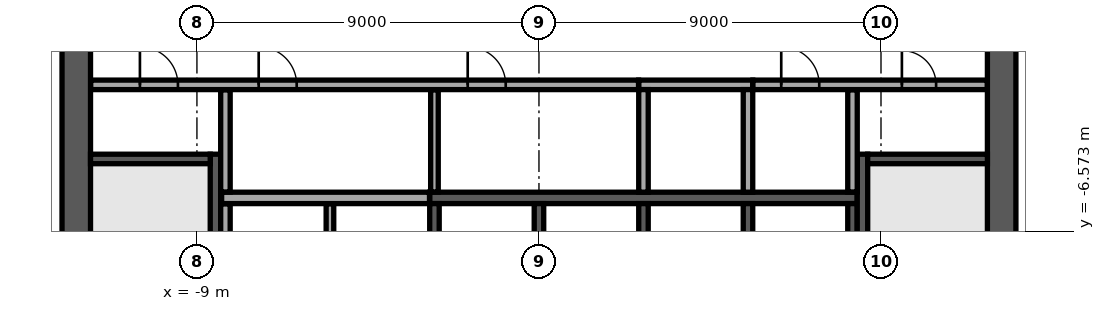
"""IFC4 building model, lengths in metres.
Left out: names, types, materials, properties, quantities, classifications, styles, units other than length and angle.
Written with IfcOpenShell. Run it as: python <this file> out.ifc"""

import sys

from ifc_helpers import new_model, si_unit, direction, frame, frame_2d, origin, place, context, subcontext, project, spatial, rectangle, extrude, element, fill, save


model = new_model("IFC4")
c1 = context("Model", 3, precision=1e-05, world=origin(), true_north=direction((0.0, 1.0)))
c2 = subcontext(c1, "Body", "Model", "MODEL_VIEW")
j1 = project(units=[si_unit("LENGTHUNIT", "METRE"), si_unit("PLANEANGLEUNIT", "RADIAN")], contexts=[c1])
p1 = place(None, origin())
s1 = spatial("IfcSite", under=j1, at=p1, CompositionType="ELEMENT")
p2 = place(p1, origin())
s2 = spatial("IfcBuilding", under=s1, at=p2, CompositionType="ELEMENT")
p3 = place(p2, frame((0.0, 0.0, 254.9)))
s3 = spatial("IfcBuildingStorey", under=s2, at=p3, CompositionType="ELEMENT", Elevation=254.9)
p4 = place(p3, frame((12.175, -11.8, 0.0), z_axis=(0.0, 0.0, 1.0), x_axis=(0.0, 1.0, 0.0)))
e1 = element("IfcWall", 1, at=p4, inside=s3, PredefinedType="SHEAR", context=c2, shape_type="SweptSolid", body=[
    extrude(rectangle(XDim=23.6, YDim=0.75, at=frame_2d((11.8, 0.0))), origin(), (0.0, 0.0, 1.0), 3.64),
])
p5 = place(p4, frame((10.6, 0.0, 0.0)))
e2 = element("IfcOpeningElement", 2, at=p5, cuts=e1, PredefinedType="OPENING", context=c2, shape_type="SweptSolid", body=[
    extrude(rectangle(XDim=2.4, YDim=2.4, at=frame_2d((1.2, 1.2))), frame((0.0, 0.385, 0.0), z_axis=(0.0, -1.0, 0.0), x_axis=(1.0, 0.0, 0.0)), (0.0, 0.0, 1.0), 0.77),
])
p6 = place(p3, frame((-12.175, -11.8, 0.0), z_axis=(0.0, 0.0, 1.0), x_axis=(0.0, 1.0, 0.0)))
e3 = element("IfcWall", 3, at=p6, inside=s3, PredefinedType="SHEAR", context=c2, shape_type="SweptSolid", body=[
    extrude(rectangle(XDim=23.6, YDim=0.75, at=frame_2d((11.8, 0.0))), origin(), (0.0, 0.0, 1.0), 3.64),
])
p7 = place(p6, frame((10.6, 0.0, 0.0)))
e4 = element("IfcOpeningElement", 4, at=p7, cuts=e3, PredefinedType="OPENING", context=c2, shape_type="SweptSolid", body=[
    extrude(rectangle(XDim=2.4, YDim=2.4, at=frame_2d((1.2, 1.2))), frame((0.0, 0.385, 0.0), z_axis=(0.0, -1.0, 0.0), x_axis=(1.0, 0.0, 0.0)), (0.0, 0.0, 1.0), 0.77),
])
p8 = place(p3, frame((-2.875, -5.7, 0.0), z_axis=(0.0, 0.0, 1.0), x_axis=(1.0, 0.0, 0.0)))
e5 = element("IfcWall", 5, at=p8, inside=s3, PredefinedType="SOLIDWALL", context=c2, shape_type="SweptSolid", body=[
    extrude(rectangle(XDim=11.25, YDim=0.3, at=frame_2d((5.625, 0.0))), origin(), (0.0, 0.0, 1.0), 3.64),
])
p9 = place(p3, frame((2.625, -2.725, 0.0), z_axis=(0.0, 0.0, 1.0), x_axis=(1.0, 0.0, 0.0)))
e6 = element("IfcWall", 6, at=p9, inside=s3, PredefinedType="SOLIDWALL", context=c2, shape_type="SweptSolid", body=[
    extrude(rectangle(XDim=3.0, YDim=0.25, at=frame_2d((1.5, 0.0))), origin(), (0.0, 0.0, 1.0), 3.64),
])
for number, where, z_axis, x_axis in (
    (7, (2.75, -5.55, 0.0), (0.0, 0.0, 1.0), (0.0, 1.0, 0.0)),
    (8, (5.5, -5.55, 0.0), (0.0, 0.0, 1.0), (0.0, 1.0, 0.0)),
    (9, (-2.75, -8.55, 0.0), (0.0, 0.0, 1.0), (0.0, 1.0, 0.0)),
    (10, (0.0, -8.55, 0.0), (0.0, 0.0, 1.0), (0.0, 1.0, 0.0)),
    (11, (2.75, -8.55, 0.0), (0.0, 0.0, 1.0), (0.0, 1.0, 0.0)),
    (12, (5.5, -8.55, 0.0), (0.0, 0.0, 1.0), (0.0, 1.0, 0.0)),
    (13, (8.25, -8.55, 0.0), (0.0, 0.0, 1.0), (0.0, 1.0, 0.0)),
):
    element("IfcWall", number, at=place(p3, frame(where, z_axis=z_axis, x_axis=x_axis)), inside=s3, PredefinedType="SOLIDWALL", context=c2, shape_type="SweptSolid", body=[
        extrude(rectangle(XDim=2.7, YDim=0.25, at=frame_2d((1.35, 0.0))), origin(), (0.0, 0.0, 1.0), 3.64),
    ])
p10 = place(p3, frame((-8.512, -4.55, 0.0), z_axis=(0.0, 0.0, 1.0), x_axis=(0.0, -1.0, 0.0)))
e14 = element("IfcWall", 14, at=p10, inside=s3, PredefinedType="SOLIDWALL", context=c2, shape_type="SweptSolid", body=[
    extrude(rectangle(XDim=7.25, YDim=0.275, at=frame_2d((3.625, 0.0))), origin(), (0.0, 0.0, 1.0), 3.64),
])
p11 = place(p10, frame((6.0, 0.0, 0.0)))
e15 = element("IfcOpeningElement", 15, at=p11, cuts=e14, PredefinedType="OPENING", context=c2, shape_type="SweptSolid", body=[
    extrude(rectangle(XDim=1.0, YDim=2.1, at=frame_2d((0.5, 1.05))), frame((0.0, 0.147, 0.0), z_axis=(0.0, -1.0, 0.0), x_axis=(1.0, 0.0, 0.0)), (0.0, 0.0, 1.0), 0.295),
])
p12 = place(p3, frame((-8.65, -4.675, 0.0), z_axis=(0.0, 0.0, 1.0), x_axis=(-1.0, 0.0, 0.0)))
e16 = element("IfcWall", 16, at=p12, inside=s3, PredefinedType="SOLIDWALL", context=c2, shape_type="SweptSolid", body=[
    extrude(rectangle(XDim=3.15, YDim=0.25, at=frame_2d((1.575, 0.0))), origin(), (0.0, 0.0, 1.0), 3.64),
])
p13 = place(p3, frame((8.512, -4.55, 0.0), z_axis=(0.0, 0.0, 1.0), x_axis=(0.0, -1.0, 0.0)))
e17 = element("IfcWall", 17, at=p13, inside=s3, PredefinedType="SOLIDWALL", context=c2, shape_type="SweptSolid", body=[
    extrude(rectangle(XDim=7.25, YDim=0.275, at=frame_2d((3.625, 0.0))), origin(), (0.0, 0.0, 1.0), 3.64),
])
p14 = place(p13, frame((6.0, 0.0, 0.0)))
e18 = element("IfcOpeningElement", 18, at=p14, cuts=e17, PredefinedType="OPENING", context=c2, shape_type="SweptSolid", body=[
    extrude(rectangle(XDim=1.0, YDim=2.1, at=frame_2d((0.5, 1.05))), frame((0.0, 0.147, 0.0), z_axis=(0.0, -1.0, 0.0), x_axis=(1.0, 0.0, 0.0)), (0.0, 0.0, 1.0), 0.295),
])
p15 = place(p3, frame((8.65, -4.675, 0.0), z_axis=(0.0, 0.0, 1.0), x_axis=(1.0, 0.0, 0.0)))
e19 = element("IfcWall", 19, at=p15, inside=s3, PredefinedType="SOLIDWALL", context=c2, shape_type="SweptSolid", body=[
    extrude(rectangle(XDim=3.15, YDim=0.25, at=frame_2d((1.575, 0.0))), origin(), (0.0, 0.0, 1.0), 3.64),
])
p16 = place(p3, frame((-8.25, -8.545, 0.0), z_axis=(0.0, 0.0, 1.0), x_axis=(0.0, 1.0, 0.0)))
e20 = element("IfcWall", 20, at=p16, inside=s3, PredefinedType="PARTITIONING", context=c2, shape_type="SweptSolid", body=[
    extrude(rectangle(XDim=2.69, YDim=0.25, at=frame_2d((1.345, 0.0))), origin(), (0.0, 0.0, 1.0), 3.64),
])
p17 = place(p3, frame((-5.5, -8.545, 0.0), z_axis=(0.0, 0.0, 1.0), x_axis=(0.0, 1.0, 0.0)))
e21 = element("IfcWall", 21, at=p17, inside=s3, PredefinedType="PARTITIONING", context=c2, shape_type="SweptSolid", body=[
    extrude(rectangle(XDim=2.69, YDim=0.2, at=frame_2d((1.345, 0.0))), origin(), (0.0, 0.0, 1.0), 3.64),
])
p18 = place(p3, frame((-8.35, -5.7, 0.0), z_axis=(0.0, 0.0, 1.0), x_axis=(1.0, 0.0, 0.0)))
e22 = element("IfcWall", 22, at=p18, inside=s3, PredefinedType="PARTITIONING", context=c2, shape_type="SweptSolid", body=[
    extrude(rectangle(XDim=5.47, YDim=0.3, at=frame_2d((2.735, 0.0))), origin(), (0.0, 0.0, 1.0), 3.64),
])
p19 = place(p3, frame((-8.25, -5.545, 0.0), z_axis=(0.0, 0.0, 1.0), x_axis=(0.0, 1.0, 0.0)))
e23 = element("IfcWall", 23, at=p19, inside=s3, PredefinedType="PARTITIONING", context=c2, shape_type="SweptSolid", body=[
    extrude(rectangle(XDim=2.69, YDim=0.25, at=frame_2d((1.345, 0.0))), origin(), (0.0, 0.0, 1.0), 3.64),
])
p20 = place(p3, frame((-2.75, -5.545, 0.0), z_axis=(0.0, 0.0, 1.0), x_axis=(0.0, 1.0, 0.0)))
e24 = element("IfcWall", 24, at=p20, inside=s3, PredefinedType="PARTITIONING", context=c2, shape_type="SweptSolid", body=[
    extrude(rectangle(XDim=2.69, YDim=0.2, at=frame_2d((1.345, 0.0))), origin(), (0.0, 0.0, 1.0), 3.64),
])
p21 = place(p3, frame((8.25, -5.545, 0.0), z_axis=(0.0, 0.0, 1.0), x_axis=(0.0, 1.0, 0.0)))
e25 = element("IfcWall", 25, at=p21, inside=s3, PredefinedType="PARTITIONING", context=c2, shape_type="SweptSolid", body=[
    extrude(rectangle(XDim=2.69, YDim=0.25, at=frame_2d((1.345, 0.0))), origin(), (0.0, 0.0, 1.0), 3.64),
])
p22 = place(p3, frame((-11.795, -2.725, 0.0), z_axis=(0.0, 0.0, 1.0), x_axis=(1.0, 0.0, 0.0)))
e26 = element("IfcWall", 26, at=p22, inside=s3, PredefinedType="PARTITIONING", context=c2, shape_type="SweptSolid", body=[
    extrude(rectangle(XDim=14.415, YDim=0.25, at=frame_2d((7.208, 0.0))), origin(), (0.0, 0.0, 1.0), 3.64),
])
p23 = place(p22, frame((1.295, 0.0, 0.0)))
e27 = element("IfcOpeningElement", 27, at=p23, cuts=e26, PredefinedType="OPENING", context=c2, shape_type="SweptSolid", body=[
    extrude(rectangle(XDim=1.0, YDim=2.1, at=frame_2d((0.5, 1.05))), frame((0.0, 0.135, 0.0), z_axis=(0.0, -1.0, 0.0), x_axis=(1.0, 0.0, 0.0)), (0.0, 0.0, 1.0), 0.27),
])
p24 = place(p22, frame((4.42, 0.0, 0.0)))
e28 = element("IfcOpeningElement", 28, at=p24, cuts=e26, PredefinedType="OPENING", context=c2, shape_type="SweptSolid", body=[
    extrude(rectangle(XDim=1.0, YDim=2.1, at=frame_2d((0.5, 1.05))), frame((0.0, 0.135, 0.0), z_axis=(0.0, -1.0, 0.0), x_axis=(1.0, 0.0, 0.0)), (0.0, 0.0, 1.0), 0.27),
])
p25 = place(p22, frame((9.92, 0.0, 0.0)))
e29 = element("IfcOpeningElement", 29, at=p25, cuts=e26, PredefinedType="OPENING", context=c2, shape_type="SweptSolid", body=[
    extrude(rectangle(XDim=1.0, YDim=2.1, at=frame_2d((0.5, 1.05))), frame((0.0, 0.135, 0.0), z_axis=(0.0, -1.0, 0.0), x_axis=(1.0, 0.0, 0.0)), (0.0, 0.0, 1.0), 0.27),
])
p26 = place(p3, frame((5.63, -2.725, 0.0), z_axis=(0.0, 0.0, 1.0), x_axis=(1.0, 0.0, 0.0)))
e30 = element("IfcWall", 30, at=p26, inside=s3, PredefinedType="PARTITIONING", context=c2, shape_type="SweptSolid", body=[
    extrude(rectangle(XDim=6.165, YDim=0.25, at=frame_2d((3.083, 0.0))), origin(), (0.0, 0.0, 1.0), 3.64),
])
p27 = place(p26, frame((0.745, 0.0, 0.0)))
e31 = element("IfcOpeningElement", 31, at=p27, cuts=e30, PredefinedType="OPENING", context=c2, shape_type="SweptSolid", body=[
    extrude(rectangle(XDim=1.0, YDim=2.1, at=frame_2d((0.5, 1.05))), frame((0.0, 0.135, 0.0), z_axis=(0.0, -1.0, 0.0), x_axis=(1.0, 0.0, 0.0)), (0.0, 0.0, 1.0), 0.27),
])
p28 = place(p26, frame((3.92, 0.0, 0.0)))
e32 = element("IfcOpeningElement", 32, at=p28, cuts=e30, PredefinedType="OPENING", context=c2, shape_type="SweptSolid", body=[
    extrude(rectangle(XDim=0.9, YDim=2.1, at=frame_2d((0.45, 1.05))), frame((0.0, 0.135, 0.0), z_axis=(0.0, -1.0, 0.0), x_axis=(1.0, 0.0, 0.0)), (0.0, 0.0, 1.0), 0.27),
])
p29 = place(p3, frame((-6.281, 33.292, 0.0), z_axis=(0.0, 0.0, 1.0), x_axis=(-0.544637268583, -0.838671715077, 0.0)))
e33 = element("IfcWall", 33, at=p29, inside=s3, PredefinedType="STANDARD", context=c2, shape_type="SweptSolid", body=[
    extrude(rectangle(XDim=48.843, YDim=0.6, at=frame_2d((24.422, 0.0))), origin(), (0.0, 0.0, 1.0), 3.64),
])
p30 = place(p29, frame((1.22, 0.0, 0.9)))
e34 = element("IfcOpeningElement", 34, at=p30, cuts=e33, PredefinedType="OPENING", context=c2, shape_type="SweptSolid", body=[
    extrude(rectangle(XDim=2.0, YDim=2.1, at=frame_2d((1.0, 1.05))), frame((0.0, 0.31, 0.0), z_axis=(0.0, -1.0, 0.0), x_axis=(1.0, 0.0, 0.0)), (0.0, 0.0, 1.0), 0.62),
])
p31 = place(p29, frame((5.66, 0.0, 0.9)))
e35 = element("IfcOpeningElement", 35, at=p31, cuts=e33, PredefinedType="OPENING", context=c2, shape_type="SweptSolid", body=[
    extrude(rectangle(XDim=2.0, YDim=2.1, at=frame_2d((1.0, 1.05))), frame((0.0, 0.31, 0.0), z_axis=(0.0, -1.0, 0.0), x_axis=(1.0, 0.0, 0.0)), (0.0, 0.0, 1.0), 0.62),
])
p32 = place(p29, frame((14.541, 0.0, 0.9)))
e36 = element("IfcOpeningElement", 36, at=p32, cuts=e33, PredefinedType="OPENING", context=c2, shape_type="SweptSolid", body=[
    extrude(rectangle(XDim=2.0, YDim=2.1, at=frame_2d((1.0, 1.05))), frame((0.0, 0.31, 0.0), z_axis=(0.0, -1.0, 0.0), x_axis=(1.0, 0.0, 0.0)), (0.0, 0.0, 1.0), 0.62),
])
p33 = place(p29, frame((18.981, 0.0, 0.9)))
e37 = element("IfcOpeningElement", 37, at=p33, cuts=e33, PredefinedType="OPENING", context=c2, shape_type="SweptSolid", body=[
    extrude(rectangle(XDim=2.0, YDim=2.1, at=frame_2d((1.0, 1.05))), frame((0.0, 0.31, 0.0), z_axis=(0.0, -1.0, 0.0), x_axis=(1.0, 0.0, 0.0)), (0.0, 0.0, 1.0), 0.62),
])
p34 = place(p29, frame((23.422, 0.0, 0.9)))
e38 = element("IfcOpeningElement", 38, at=p34, cuts=e33, PredefinedType="OPENING", context=c2, shape_type="SweptSolid", body=[
    extrude(rectangle(XDim=2.0, YDim=2.1, at=frame_2d((1.0, 1.05))), frame((0.0, 0.31, 0.0), z_axis=(0.0, -1.0, 0.0), x_axis=(1.0, 0.0, 0.0)), (0.0, 0.0, 1.0), 0.62),
])
p35 = place(p29, frame((27.862, 0.0, 0.9)))
e39 = element("IfcOpeningElement", 39, at=p35, cuts=e33, PredefinedType="OPENING", context=c2, shape_type="SweptSolid", body=[
    extrude(rectangle(XDim=2.0, YDim=2.1, at=frame_2d((1.0, 1.05))), frame((0.0, 0.31, 0.0), z_axis=(0.0, -1.0, 0.0), x_axis=(1.0, 0.0, 0.0)), (0.0, 0.0, 1.0), 0.62),
])
p36 = place(p29, frame((32.302, 0.0, 0.9)))
e40 = element("IfcOpeningElement", 40, at=p36, cuts=e33, PredefinedType="OPENING", context=c2, shape_type="SweptSolid", body=[
    extrude(rectangle(XDim=2.0, YDim=2.1, at=frame_2d((1.0, 1.05))), frame((0.0, 0.31, 0.0), z_axis=(0.0, -1.0, 0.0), x_axis=(1.0, 0.0, 0.0)), (0.0, 0.0, 1.0), 0.62),
])
p37 = place(p29, frame((36.742, 0.0, 0.9)))
e41 = element("IfcOpeningElement", 41, at=p37, cuts=e33, PredefinedType="OPENING", context=c2, shape_type="SweptSolid", body=[
    extrude(rectangle(XDim=2.0, YDim=2.1, at=frame_2d((1.0, 1.05))), frame((0.0, 0.31, 0.0), z_axis=(0.0, -1.0, 0.0), x_axis=(1.0, 0.0, 0.0)), (0.0, 0.0, 1.0), 0.62),
])
p38 = place(p29, frame((41.183, 0.0, 0.9)))
e42 = element("IfcOpeningElement", 42, at=p38, cuts=e33, PredefinedType="OPENING", context=c2, shape_type="SweptSolid", body=[
    extrude(rectangle(XDim=2.0, YDim=2.1, at=frame_2d((1.0, 1.05))), frame((0.0, 0.31, 0.0), z_axis=(0.0, -1.0, 0.0), x_axis=(1.0, 0.0, 0.0)), (0.0, 0.0, 1.0), 0.62),
])
p39 = place(p29, frame((45.623, 0.0, 0.9)))
e43 = element("IfcOpeningElement", 43, at=p39, cuts=e33, PredefinedType="OPENING", context=c2, shape_type="SweptSolid", body=[
    extrude(rectangle(XDim=2.0, YDim=2.1, at=frame_2d((1.0, 1.05))), frame((0.0, 0.31, 0.0), z_axis=(0.0, -1.0, 0.0), x_axis=(1.0, 0.0, 0.0)), (0.0, 0.0, 1.0), 0.62),
])
p40 = place(p3, frame((6.367, -33.16, 0.0), z_axis=(0.0, 0.0, 1.0), x_axis=(0.544637371147, 0.838671648472, 0.0)))
e44 = element("IfcWall", 44, at=p40, inside=s3, PredefinedType="STANDARD", context=c2, shape_type="SweptSolid", body=[
    extrude(rectangle(XDim=48.686, YDim=0.6, at=frame_2d((24.343, 0.0))), origin(), (0.0, 0.0, 1.0), 3.64),
])
p41 = place(p40, frame((1.213, 0.0, 0.9)))
e45 = element("IfcOpeningElement", 45, at=p41, cuts=e44, PredefinedType="OPENING", context=c2, shape_type="SweptSolid", body=[
    extrude(rectangle(XDim=2.0, YDim=2.1, at=frame_2d((1.0, 1.05))), frame((0.0, 0.31, 0.0), z_axis=(0.0, -1.0, 0.0), x_axis=(1.0, 0.0, 0.0)), (0.0, 0.0, 1.0), 0.62),
])
p42 = place(p40, frame((5.639, 0.0, 0.9)))
e46 = element("IfcOpeningElement", 46, at=p42, cuts=e44, PredefinedType="OPENING", context=c2, shape_type="SweptSolid", body=[
    extrude(rectangle(XDim=2.0, YDim=2.1, at=frame_2d((1.0, 1.05))), frame((0.0, 0.31, 0.0), z_axis=(0.0, -1.0, 0.0), x_axis=(1.0, 0.0, 0.0)), (0.0, 0.0, 1.0), 0.62),
])
p43 = place(p40, frame((14.491, 0.0, 0.9)))
e47 = element("IfcOpeningElement", 47, at=p43, cuts=e44, PredefinedType="OPENING", context=c2, shape_type="SweptSolid", body=[
    extrude(rectangle(XDim=2.0, YDim=2.1, at=frame_2d((1.0, 1.05))), frame((0.0, 0.31, 0.0), z_axis=(0.0, -1.0, 0.0), x_axis=(1.0, 0.0, 0.0)), (0.0, 0.0, 1.0), 0.62),
])
p44 = place(p40, frame((18.917, 0.0, 0.9)))
e48 = element("IfcOpeningElement", 48, at=p44, cuts=e44, PredefinedType="OPENING", context=c2, shape_type="SweptSolid", body=[
    extrude(rectangle(XDim=2.0, YDim=2.1, at=frame_2d((1.0, 1.05))), frame((0.0, 0.31, 0.0), z_axis=(0.0, -1.0, 0.0), x_axis=(1.0, 0.0, 0.0)), (0.0, 0.0, 1.0), 0.62),
])
p45 = place(p40, frame((23.343, 0.0, 0.9)))
e49 = element("IfcOpeningElement", 49, at=p45, cuts=e44, PredefinedType="OPENING", context=c2, shape_type="SweptSolid", body=[
    extrude(rectangle(XDim=2.0, YDim=2.1, at=frame_2d((1.0, 1.05))), frame((0.0, 0.31, 0.0), z_axis=(0.0, -1.0, 0.0), x_axis=(1.0, 0.0, 0.0)), (0.0, 0.0, 1.0), 0.62),
])
p46 = place(p40, frame((27.769, 0.0, 0.9)))
e50 = element("IfcOpeningElement", 50, at=p46, cuts=e44, PredefinedType="OPENING", context=c2, shape_type="SweptSolid", body=[
    extrude(rectangle(XDim=2.0, YDim=2.1, at=frame_2d((1.0, 1.05))), frame((0.0, 0.31, 0.0), z_axis=(0.0, -1.0, 0.0), x_axis=(1.0, 0.0, 0.0)), (0.0, 0.0, 1.0), 0.62),
])
p47 = place(p40, frame((32.195, 0.0, 0.9)))
e51 = element("IfcOpeningElement", 51, at=p47, cuts=e44, PredefinedType="OPENING", context=c2, shape_type="SweptSolid", body=[
    extrude(rectangle(XDim=2.0, YDim=2.1, at=frame_2d((1.0, 1.05))), frame((0.0, 0.31, 0.0), z_axis=(0.0, -1.0, 0.0), x_axis=(1.0, 0.0, 0.0)), (0.0, 0.0, 1.0), 0.62),
])
p48 = place(p40, frame((36.621, 0.0, 0.9)))
e52 = element("IfcOpeningElement", 52, at=p48, cuts=e44, PredefinedType="OPENING", context=c2, shape_type="SweptSolid", body=[
    extrude(rectangle(XDim=2.0, YDim=2.1, at=frame_2d((1.0, 1.05))), frame((0.0, 0.31, 0.0), z_axis=(0.0, -1.0, 0.0), x_axis=(1.0, 0.0, 0.0)), (0.0, 0.0, 1.0), 0.62),
])
p49 = place(p40, frame((41.047, 0.0, 0.9)))
e53 = element("IfcOpeningElement", 53, at=p49, cuts=e44, PredefinedType="OPENING", context=c2, shape_type="SweptSolid", body=[
    extrude(rectangle(XDim=2.0, YDim=2.1, at=frame_2d((1.0, 1.05))), frame((0.0, 0.31, 0.0), z_axis=(0.0, -1.0, 0.0), x_axis=(1.0, 0.0, 0.0)), (0.0, 0.0, 1.0), 0.62),
])
p50 = place(p40, frame((45.473, 0.0, 0.9)))
e54 = element("IfcOpeningElement", 54, at=p50, cuts=e44, PredefinedType="OPENING", context=c2, shape_type="SweptSolid", body=[
    extrude(rectangle(XDim=2.0, YDim=2.1, at=frame_2d((1.0, 1.05))), frame((0.0, 0.31, 0.0), z_axis=(0.0, -1.0, 0.0), x_axis=(1.0, 0.0, 0.0)), (0.0, 0.0, 1.0), 0.62),
])
p51 = place(p3, frame((-26.791, -5.221, 0.0), z_axis=(0.0, 0.0, 1.0), x_axis=(0.838671905754, -0.544636974965, 0.0)))
e55 = element("IfcWall", 55, at=p51, inside=s3, PredefinedType="PARTITIONING", context=c2, shape_type="SweptSolid", body=[
    extrude(rectangle(XDim=39.325, YDim=0.15, at=frame_2d((19.663, 0.0))), origin(), (0.0, 0.0, 1.0), 3.04),
])
p52 = place(p51, frame((2.05, 0.0, 0.0)))
e56 = element("IfcOpeningElement", 56, at=p52, cuts=e55, PredefinedType="OPENING", context=c2, shape_type="SweptSolid", body=[
    extrude(rectangle(XDim=1.0, YDim=2.1, at=frame_2d((0.5, 1.05))), frame((0.0, 0.085, 0.0), z_axis=(0.0, -1.0, 0.0), x_axis=(1.0, 0.0, 0.0)), (0.0, 0.0, 1.0), 0.17),
])
p53 = place(p51, frame((9.807, 0.0, 0.0)))
e57 = element("IfcOpeningElement", 57, at=p53, cuts=e55, PredefinedType="OPENING", context=c2, shape_type="SweptSolid", body=[
    extrude(rectangle(XDim=1.0, YDim=2.1, at=frame_2d((0.5, 1.05))), frame((0.0, 0.085, 0.0), z_axis=(0.0, -1.0, 0.0), x_axis=(1.0, 0.0, 0.0)), (0.0, 0.0, 1.0), 0.17),
])
p54 = place(p51, frame((18.866, 0.0, 0.0)))
e58 = element("IfcOpeningElement", 58, at=p54, cuts=e55, PredefinedType="OPENING", context=c2, shape_type="SweptSolid", body=[
    extrude(rectangle(XDim=1.0, YDim=2.1, at=frame_2d((0.5, 1.05))), frame((0.0, 0.085, 0.0), z_axis=(0.0, -1.0, 0.0), x_axis=(1.0, 0.0, 0.0)), (0.0, 0.0, 1.0), 0.17),
])
p55 = place(p51, frame((25.009, 0.0, 0.0)))
e59 = element("IfcOpeningElement", 59, at=p55, cuts=e55, PredefinedType="OPENING", context=c2, shape_type="SweptSolid", body=[
    extrude(rectangle(XDim=1.0, YDim=2.1, at=frame_2d((0.5, 1.05))), frame((0.0, 0.085, 0.0), z_axis=(0.0, -1.0, 0.0), x_axis=(1.0, 0.0, 0.0)), (0.0, 0.0, 1.0), 0.17),
])
p56 = place(p51, frame((36.069, 0.0, 0.0)))
e60 = element("IfcOpeningElement", 60, at=p56, cuts=e55, PredefinedType="OPENING", context=c2, shape_type="SweptSolid", body=[
    extrude(rectangle(XDim=1.8, YDim=2.1, at=frame_2d((0.9, 1.05))), frame((0.0, 0.085, 0.0), z_axis=(0.0, -1.0, 0.0), x_axis=(1.0, 0.0, 0.0)), (0.0, 0.0, 1.0), 0.17),
])
p57 = place(p23, origin())
e61 = element("IfcDoor", 61, at=p57, inside=s3, OperationType="SINGLE_SWING_LEFT", PredefinedType="DOOR", context=c2, shape_type="SweptSolid", body=[
    extrude(rectangle(XDim=1.0, YDim=2.1, at=frame_2d((0.5, 1.05))), frame((0.0, 0.025, 0.0), z_axis=(0.0, -1.0, 0.0), x_axis=(1.0, 0.0, 0.0)), (0.0, 0.0, 1.0), 0.05),
])
fill(e27, e61)
p58 = place(p27, origin())
e62 = element("IfcDoor", 62, at=p58, inside=s3, OperationType="SINGLE_SWING_LEFT", PredefinedType="DOOR", context=c2, shape_type="SweptSolid", body=[
    extrude(rectangle(XDim=1.0, YDim=2.1, at=frame_2d((0.5, 1.05))), frame((0.0, 0.025, 0.0), z_axis=(0.0, -1.0, 0.0), x_axis=(1.0, 0.0, 0.0)), (0.0, 0.0, 1.0), 0.05),
])
fill(e31, e62)
p59 = place(p28, origin())
e63 = element("IfcDoor", 63, at=p59, inside=s3, OperationType="SINGLE_SWING_LEFT", PredefinedType="DOOR", context=c2, shape_type="SweptSolid", body=[
    extrude(rectangle(XDim=0.9, YDim=2.1, at=frame_2d((0.45, 1.05))), frame((0.0, 0.025, 0.0), z_axis=(0.0, -1.0, 0.0), x_axis=(1.0, 0.0, 0.0)), (0.0, 0.0, 1.0), 0.05),
])
fill(e32, e63)
p60 = place(p24, origin())
e64 = element("IfcDoor", 64, at=p60, inside=s3, OperationType="SINGLE_SWING_LEFT", PredefinedType="DOOR", context=c2, shape_type="SweptSolid", body=[
    extrude(rectangle(XDim=1.0, YDim=2.1, at=frame_2d((0.5, 1.05))), frame((0.0, 0.025, 0.0), z_axis=(0.0, -1.0, 0.0), x_axis=(1.0, 0.0, 0.0)), (0.0, 0.0, 1.0), 0.05),
])
fill(e28, e64)
p61 = place(p25, origin())
e65 = element("IfcDoor", 65, at=p61, inside=s3, OperationType="SINGLE_SWING_LEFT", PredefinedType="DOOR", context=c2, shape_type="SweptSolid", body=[
    extrude(rectangle(XDim=1.0, YDim=2.1, at=frame_2d((0.5, 1.05))), frame((0.0, 0.025, 0.0), z_axis=(0.0, -1.0, 0.0), x_axis=(1.0, 0.0, 0.0)), (0.0, 0.0, 1.0), 0.05),
])
fill(e29, e65)
save(model, sys.argv[1])
